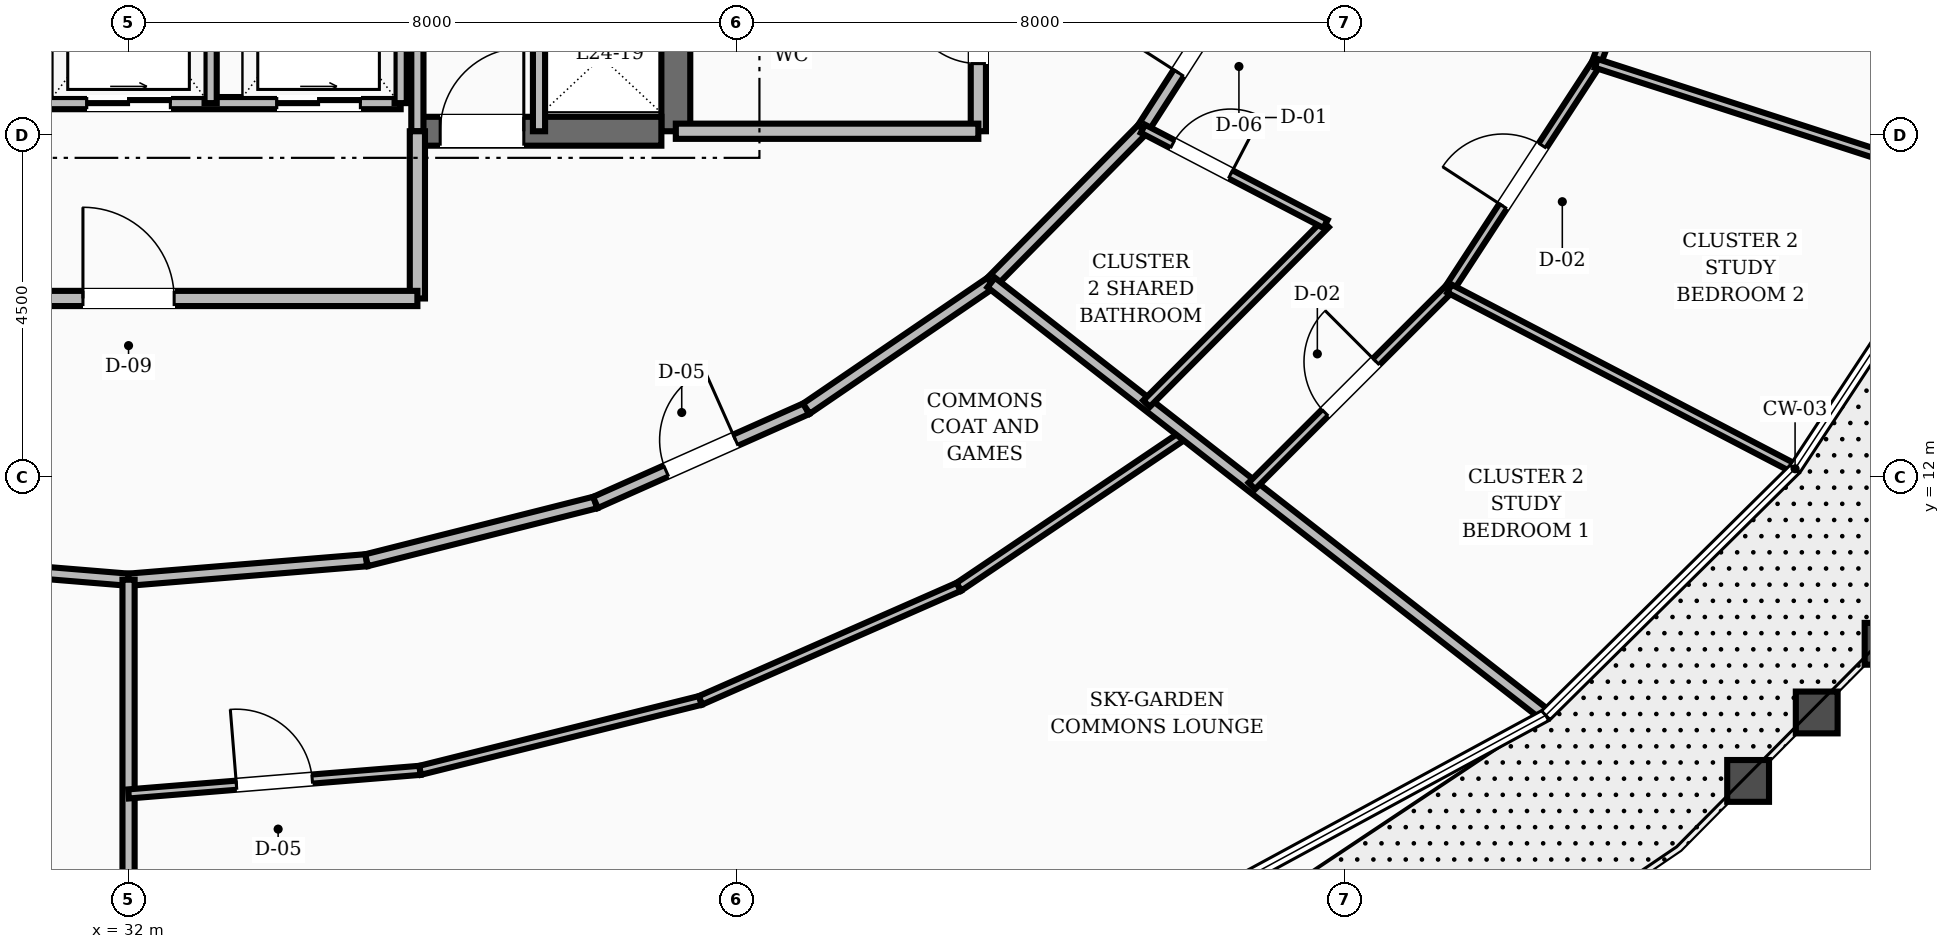
"""IFC4 building model, lengths in metres.
Left out: names, types, materials, properties, quantities, classifications, styles, units other than length and angle.
Written with IfcOpenShell. Run it as: python <this file> out.ifc"""

import sys

from ifc_helpers import new_model, si_unit, direction, frame, frame_2d, origin, place, context, subcontext, project, spatial, rectangle, extrude, element, fill, save


model = new_model("IFC4")
c1 = context("Model", 3, precision=1e-05, world=origin(), true_north=direction((0.0, 1.0)))
c2 = subcontext(c1, "Body", "Model", "MODEL_VIEW")
j1 = project(units=[si_unit("LENGTHUNIT", "METRE"), si_unit("PLANEANGLEUNIT", "RADIAN")], contexts=[c1])
p1 = place(None, origin())
s1 = spatial("IfcSite", under=j1, at=p1, CompositionType="ELEMENT")
p2 = place(p1, origin())
s2 = spatial("IfcBuilding", under=s1, at=p2, CompositionType="ELEMENT")
p3 = place(p2, frame((0.0, 0.0, 95.2)))
s3 = spatial("IfcBuildingStorey", under=s2, at=p3, CompositionType="ELEMENT", Elevation=95.2)
p4 = place(p3, frame((39.2, 16.55, 0.0), z_axis=(0.0, 0.0, 1.0), x_axis=(0.0, 1.0, 0.0)))
e1 = element("IfcWall", 1, at=p4, inside=s3, PredefinedType="SHEAR", context=c2, shape_type="SweptSolid", body=[
    extrude(rectangle(XDim=6.3, YDim=0.38, at=frame_2d((3.15, 0.0))), origin(), (0.0, 0.0, 1.0), 3.6),
])
p5 = place(p3, frame((35.8, 16.55, 0.0), z_axis=(0.0, 0.0, 1.0), x_axis=(1.0, 0.0, 0.0)))
e2 = element("IfcWall", 2, at=p5, inside=s3, PredefinedType="SHEAR", context=c2, shape_type="SweptSolid", body=[
    extrude(rectangle(XDim=3.21, YDim=0.38, at=frame_2d((1.605, 0.0))), origin(), (0.0, 0.0, 1.0), 3.6),
])
p6 = place(p5, frame((0.3, 0.0, 0.0)))
e3 = element("IfcOpeningElement", 3, at=p6, cuts=e2, PredefinedType="OPENING", context=c2, shape_type="SweptSolid", body=[
    extrude(rectangle(XDim=1.1, YDim=2.1, at=frame_2d((0.55, 1.05))), frame((0.0, 0.2, 0.0), z_axis=(0.0, -1.0, 0.0), x_axis=(1.0, 0.0, 0.0)), (0.0, 0.0, 1.0), 0.4),
])
p7 = place(p3, frame((43.18, 16.55, 0.0), z_axis=(0.0, 0.0, 1.0), x_axis=(0.0, 1.0, 0.0)))
e4 = element("IfcWall", 4, at=p7, inside=s3, PredefinedType="SOLIDWALL", context=c2, shape_type="SweptSolid", body=[
    extrude(rectangle(XDim=2.73, YDim=0.2, at=frame_2d((1.365, 0.0))), origin(), (0.0, 0.0, 1.0), 2.71),
])
p8 = place(p7, frame((0.89, 0.0, 0.0)))
e5 = element("IfcOpeningElement", 5, at=p8, cuts=e4, PredefinedType="OPENING", context=c2, shape_type="SweptSolid", body=[
    extrude(rectangle(XDim=0.95, YDim=2.1, at=frame_2d((0.475, 1.05))), frame((0.0, 0.11, 0.0), z_axis=(0.0, -1.0, 0.0), x_axis=(1.0, 0.0, 0.0)), (0.0, 0.0, 1.0), 0.22),
])
p9 = place(p3, frame((39.2, 16.55, 0.0), z_axis=(0.0, 0.0, 1.0), x_axis=(1.0, 0.0, 0.0)))
e6 = element("IfcWall", 6, at=p9, inside=s3, PredefinedType="SOLIDWALL", context=c2, shape_type="SweptSolid", body=[
    extrude(rectangle(XDim=3.98, YDim=0.2, at=frame_2d((1.99, 0.0))), origin(), (0.0, 0.0, 1.0), 2.71),
])
p10 = place(p3, frame((35.8, 16.55, 0.0), z_axis=(0.0, 0.0, 1.0), x_axis=(0.0, 1.0, 0.0)))
e7 = element("IfcWall", 7, at=p10, inside=s3, PredefinedType="SOLIDWALL", context=c2, shape_type="SweptSolid", body=[
    extrude(rectangle(XDim=3.3, YDim=0.16, at=frame_2d((1.65, 0.0))), origin(), (0.0, 0.0, 1.0), 2.71),
])
p11 = place(p3, frame((37.4, 16.55, 0.0), z_axis=(0.0, 0.0, 1.0), x_axis=(0.0, 1.0, 0.0)))
e8 = element("IfcWall", 8, at=p11, inside=s3, PredefinedType="SOLIDWALL", context=c2, shape_type="SweptSolid", body=[
    extrude(rectangle(XDim=1.75, YDim=0.16, at=frame_2d((0.875, 0.0))), origin(), (0.0, 0.0, 1.0), 2.71),
])
p12 = place(p3, frame((35.8, 14.35, 0.0), z_axis=(0.0, 0.0, 1.0), x_axis=(0.0, 1.0, 0.0)))
e9 = element("IfcWall", 9, at=p12, inside=s3, PredefinedType="SOLIDWALL", context=c2, shape_type="SweptSolid", body=[
    extrude(rectangle(XDim=2.2, YDim=0.2, at=frame_2d((1.1, 0.0))), origin(), (0.0, 0.0, 1.0), 2.71),
])
p13 = place(p3, frame((28.2, 14.35, 0.0), z_axis=(0.0, 0.0, 1.0), x_axis=(1.0, 0.0, 0.0)))
e10 = element("IfcWall", 10, at=p13, inside=s3, PredefinedType="SOLIDWALL", context=c2, shape_type="SweptSolid", body=[
    extrude(rectangle(XDim=7.6, YDim=0.2, at=frame_2d((3.8, 0.0))), origin(), (0.0, 0.0, 1.0), 2.71),
])
p14 = place(p13, frame((3.2, 0.0, 0.0)))
e11 = element("IfcOpeningElement", 11, at=p14, cuts=e10, PredefinedType="OPENING", context=c2, shape_type="SweptSolid", body=[
    extrude(rectangle(XDim=1.2, YDim=2.1, at=frame_2d((0.6, 1.05))), frame((0.0, 0.11, 0.0), z_axis=(0.0, -1.0, 0.0), x_axis=(1.0, 0.0, 0.0)), (0.0, 0.0, 1.0), 0.22),
])
p15 = place(p3, frame((28.42, 16.92, 0.0), z_axis=(0.0, 0.0, 1.0), x_axis=(1.0, 0.0, 0.0)))
e12 = element("IfcWall", 12, at=p15, inside=s3, PredefinedType="SOLIDWALL", context=c2, shape_type="SweptSolid", body=[
    extrude(rectangle(XDim=7.16, YDim=0.16, at=frame_2d((3.58, 0.0))), origin(), (0.0, 0.0, 1.0), 2.71),
])
p16 = place(p15, frame((0.53, 0.0, 0.0)))
e13 = element("IfcOpeningElement", 13, at=p16, cuts=e12, PredefinedType="OPENING", context=c2, shape_type="SweptSolid", body=[
    extrude(rectangle(XDim=1.1, YDim=2.15, at=frame_2d((0.55, 1.075))), frame((0.0, 0.09, 0.0), z_axis=(0.0, -1.0, 0.0), x_axis=(1.0, 0.0, 0.0)), (0.0, 0.0, 1.0), 0.18),
])
p17 = place(p15, frame((3.03, 0.0, 0.0)))
e14 = element("IfcOpeningElement", 14, at=p17, cuts=e12, PredefinedType="OPENING", context=c2, shape_type="SweptSolid", body=[
    extrude(rectangle(XDim=1.1, YDim=2.15, at=frame_2d((0.55, 1.075))), frame((0.0, 0.09, 0.0), z_axis=(0.0, -1.0, 0.0), x_axis=(1.0, 0.0, 0.0)), (0.0, 0.0, 1.0), 0.18),
])
p18 = place(p15, frame((5.53, 0.0, 0.0)))
e15 = element("IfcOpeningElement", 15, at=p18, cuts=e12, PredefinedType="OPENING", context=c2, shape_type="SweptSolid", body=[
    extrude(rectangle(XDim=1.1, YDim=2.15, at=frame_2d((0.55, 1.075))), frame((0.0, 0.09, 0.0), z_axis=(0.0, -1.0, 0.0), x_axis=(1.0, 0.0, 0.0)), (0.0, 0.0, 1.0), 0.18),
])
for number, where, z_axis, x_axis in (
    (16, (33.08, 16.92, 0.0), (0.0, 0.0, 1.0), (0.0, 1.0, 0.0)),
    (17, (35.58, 16.92, 0.0), (0.0, 0.0, 1.0), (0.0, 1.0, 0.0)),
):
    element("IfcWall", number, at=place(p3, frame(where, z_axis=z_axis, x_axis=x_axis)), inside=s3, PredefinedType="SOLIDWALL", context=c2, shape_type="SweptSolid", body=[
        extrude(rectangle(XDim=2.76, YDim=0.16, at=frame_2d((1.38, 0.0))), origin(), (0.0, 0.0, 1.0), 2.71),
    ])
p19 = place(p3, frame((28.869, 10.906, 0.0), z_axis=(0.0, 0.0, 1.0), x_axis=(0.996658973252, -0.081675522876, 0.0)))
e18 = element("IfcWall", 18, at=p19, inside=s3, PredefinedType="SOLIDWALL", context=c2, shape_type="SweptSolid", body=[
    extrude(rectangle(XDim=3.142, YDim=0.16, at=frame_2d((1.571, 0.0))), origin(), (0.0, 0.0, 1.0), 2.71),
])
p20 = place(p19, frame((1.096, 0.0, 0.0)))
e19 = element("IfcOpeningElement", 19, at=p20, cuts=e18, PredefinedType="OPENING", context=c2, shape_type="SweptSolid", body=[
    extrude(rectangle(XDim=0.95, YDim=2.1, at=frame_2d((0.475, 1.05))), frame((0.0, 0.09, 0.0), z_axis=(0.0, -1.0, 0.0), x_axis=(1.0, 0.0, 0.0)), (0.0, 0.0, 1.0), 0.18),
])
p21 = place(p3, frame((32.0, 10.65, 0.0), z_axis=(0.0, 0.0, 1.0), x_axis=(0.996658973252, 0.081675522876, 0.0)))
e20 = element("IfcWall", 20, at=p21, inside=s3, PredefinedType="SOLIDWALL", context=c2, shape_type="SweptSolid", body=[
    extrude(rectangle(XDim=3.142, YDim=0.16, at=frame_2d((1.571, 0.0))), origin(), (0.0, 0.0, 1.0), 2.71),
])
p22 = place(p3, frame((35.131, 10.906, 0.0), z_axis=(0.0, 0.0, 1.0), x_axis=(0.969608333194, 0.244662380029, 0.0)))
e21 = element("IfcWall", 21, at=p22, inside=s3, PredefinedType="SOLIDWALL", context=c2, shape_type="SweptSolid", body=[
    extrude(rectangle(XDim=3.105, YDim=0.16, at=frame_2d((1.553, 0.0))), origin(), (0.0, 0.0, 1.0), 2.71),
])
p23 = place(p3, frame((38.142, 11.666, 0.0), z_axis=(0.0, 0.0, 1.0), x_axis=(0.913768445178, 0.406235434936, 0.0)))
e22 = element("IfcWall", 22, at=p23, inside=s3, PredefinedType="SOLIDWALL", context=c2, shape_type="SweptSolid", body=[
    extrude(rectangle(XDim=3.037, YDim=0.16, at=frame_2d((1.519, 0.0))), origin(), (0.0, 0.0, 1.0), 2.71),
])
p24 = place(p23, frame((1.018, 0.0, 0.0)))
e23 = element("IfcOpeningElement", 23, at=p24, cuts=e22, PredefinedType="OPENING", context=c2, shape_type="SweptSolid", body=[
    extrude(rectangle(XDim=1.0, YDim=2.1, at=frame_2d((0.5, 1.05))), frame((0.0, 0.09, 0.0), z_axis=(0.0, -1.0, 0.0), x_axis=(1.0, 0.0, 0.0)), (0.0, 0.0, 1.0), 0.18),
])
p25 = place(p3, frame((40.917, 12.9, 0.0), z_axis=(0.0, 0.0, 1.0), x_axis=(0.825929039072, 0.563774088104, 0.0)))
e24 = element("IfcWall", 24, at=p25, inside=s3, PredefinedType="SOLIDWALL", context=c2, shape_type="SweptSolid", body=[
    extrude(rectangle(XDim=2.945, YDim=0.16, at=frame_2d((1.472, 0.0))), origin(), (0.0, 0.0, 1.0), 2.71),
])
p26 = place(p3, frame((43.349, 14.56, 0.0), z_axis=(0.0, 0.0, 1.0), x_axis=(0.702366174226, 0.711815816981, 0.0)))
e25 = element("IfcWall", 25, at=p26, inside=s3, PredefinedType="SOLIDWALL", context=c2, shape_type="SweptSolid", body=[
    extrude(rectangle(XDim=2.842, YDim=0.16, at=frame_2d((1.421, 0.0))), origin(), (0.0, 0.0, 1.0), 2.71),
])
p27 = place(p3, frame((45.345, 16.583, 0.0), z_axis=(0.0, 0.0, 1.0), x_axis=(0.540595670038, 0.841282545603, 0.0)))
e26 = element("IfcWall", 26, at=p27, inside=s3, PredefinedType="SOLIDWALL", context=c2, shape_type="SweptSolid", body=[
    extrude(rectangle(XDim=2.744, YDim=0.16, at=frame_2d((1.372, 0.0))), origin(), (0.0, 0.0, 1.0), 2.71),
])
p28 = place(p27, frame((0.872, 0.0, 0.0)))
e27 = element("IfcOpeningElement", 27, at=p28, cuts=e26, PredefinedType="OPENING", context=c2, shape_type="SweptSolid", body=[
    extrude(rectangle(XDim=1.0, YDim=2.1, at=frame_2d((0.5, 1.05))), frame((0.0, 0.09, 0.0), z_axis=(0.0, -1.0, 0.0), x_axis=(1.0, 0.0, 0.0)), (0.0, 0.0, 1.0), 0.18),
])
p29 = place(p3, frame((32.0, 10.65, 0.0), z_axis=(0.0, 0.0, 1.0), x_axis=(0.0, -1.0, 0.0)))
e28 = element("IfcWall", 28, at=p29, inside=s3, PredefinedType="SOLIDWALL", context=c2, shape_type="SweptSolid", body=[
    extrude(rectangle(XDim=8.002, YDim=0.16, at=frame_2d((4.001, 0.0))), origin(), (0.0, 0.0, 1.0), 2.71),
])
p30 = place(p3, frame((32.0, 7.832, 0.0), z_axis=(0.0, 0.0, 1.0), x_axis=(0.996738571309, 0.080698330005, 0.0)))
e29 = element("IfcWall", 29, at=p30, inside=s3, PredefinedType="PARTITIONING", context=c2, shape_type="SweptSolid", body=[
    extrude(rectangle(XDim=3.848, YDim=0.12, at=frame_2d((1.924, 0.0))), origin(), (0.0, 0.0, 1.0), 2.71),
])
p31 = place(p30, frame((1.424, 0.0, 0.0)))
e30 = element("IfcOpeningElement", 30, at=p31, cuts=e29, PredefinedType="OPENING", context=c2, shape_type="SweptSolid", body=[
    extrude(rectangle(XDim=1.0, YDim=2.1, at=frame_2d((0.5, 1.05))), frame((0.0, 0.07, 0.0), z_axis=(0.0, -1.0, 0.0), x_axis=(1.0, 0.0, 0.0)), (0.0, 0.0, 1.0), 0.14),
])
p32 = place(p3, frame((35.836, 8.142, 0.0), z_axis=(0.0, 0.0, 1.0), x_axis=(0.970263267769, 0.242052042376, 0.0)))
e31 = element("IfcWall", 31, at=p32, inside=s3, PredefinedType="PARTITIONING", context=c2, shape_type="SweptSolid", body=[
    extrude(rectangle(XDim=3.802, YDim=0.12, at=frame_2d((1.901, 0.0))), origin(), (0.0, 0.0, 1.0), 2.71),
])
p33 = place(p3, frame((39.524, 9.062, 0.0), z_axis=(0.0, 0.0, 1.0), x_axis=(0.915498172981, 0.402322128733, 0.0)))
e32 = element("IfcWall", 32, at=p33, inside=s3, PredefinedType="PARTITIONING", context=c2, shape_type="SweptSolid", body=[
    extrude(rectangle(XDim=3.713, YDim=0.12, at=frame_2d((1.856, 0.0))), origin(), (0.0, 0.0, 1.0), 2.71),
])
p34 = place(p3, frame((42.924, 10.556, 0.0), z_axis=(0.0, 0.0, 1.0), x_axis=(0.828880957911, 0.559425024121, 0.0)))
e33 = element("IfcWall", 33, at=p34, inside=s3, PredefinedType="PARTITIONING", context=c2, shape_type="SweptSolid", body=[
    extrude(rectangle(XDim=3.594, YDim=0.12, at=frame_2d((1.797, 0.0))), origin(), (0.0, 0.0, 1.0), 2.71),
])
p35 = place(p3, frame((43.349, 14.56, 0.0), z_axis=(0.0, 0.0, 1.0), x_axis=(0.788377274066, -0.615192062478, 0.0)))
e34 = element("IfcWall", 34, at=p35, inside=s3, PredefinedType="SOLIDWALL", context=c2, shape_type="SweptSolid", body=[
    extrude(rectangle(XDim=9.205, YDim=0.16, at=frame_2d((4.603, 0.0))), origin(), (0.0, 0.0, 1.0), 2.71),
])
p36 = place(p3, frame((45.392, 12.966, 0.0), z_axis=(0.0, 0.0, 1.0), x_axis=(0.705715635455, 0.708495195379, 0.0)))
e35 = element("IfcWall", 35, at=p36, inside=s3, PredefinedType="PARTITIONING", context=c2, shape_type="SweptSolid", body=[
    extrude(rectangle(XDim=3.338, YDim=0.12, at=frame_2d((1.669, 0.0))), origin(), (0.0, 0.0, 1.0), 2.71),
])
p37 = place(p3, frame((45.345, 16.583, 0.0), z_axis=(0.0, 0.0, 1.0), x_axis=(0.886729414964, -0.46228881085, 0.0)))
e36 = element("IfcWall", 36, at=p37, inside=s3, PredefinedType="PARTITIONING", context=c2, shape_type="SweptSolid", body=[
    extrude(rectangle(XDim=2.709, YDim=0.12, at=frame_2d((1.354, 0.0))), origin(), (0.0, 0.0, 1.0), 2.71),
])
p38 = place(p37, frame((0.44, 0.0, 0.0)))
e37 = element("IfcOpeningElement", 37, at=p38, cuts=e36, PredefinedType="OPENING", context=c2, shape_type="SweptSolid", body=[
    extrude(rectangle(XDim=0.86, YDim=2.1, at=frame_2d((0.43, 1.05))), frame((0.0, 0.07, 0.0), z_axis=(0.0, -1.0, 0.0), x_axis=(1.0, 0.0, 0.0)), (0.0, 0.0, 1.0), 0.14),
])
p39 = place(p3, frame((46.779, 11.884, 0.0), z_axis=(0.0, 0.0, 1.0), x_axis=(0.707472185224, 0.706741188226, 0.0)))
e38 = element("IfcWall", 38, at=p39, inside=s3, PredefinedType="PARTITIONING", context=c2, shape_type="SweptSolid", body=[
    extrude(rectangle(XDim=3.674, YDim=0.12, at=frame_2d((1.837, 0.0))), origin(), (0.0, 0.0, 1.0), 2.71),
])
p40 = place(p39, frame((1.362, 0.0, 0.0)))
e39 = element("IfcOpeningElement", 39, at=p40, cuts=e38, PredefinedType="OPENING", context=c2, shape_type="SweptSolid", body=[
    extrude(rectangle(XDim=0.95, YDim=2.1, at=frame_2d((0.475, 1.05))), frame((0.0, 0.07, 0.0), z_axis=(0.0, -1.0, 0.0), x_axis=(1.0, 0.0, 0.0)), (0.0, 0.0, 1.0), 0.14),
])
p41 = place(p3, frame((49.378, 14.48, 0.0), z_axis=(0.0, 0.0, 1.0), x_axis=(0.546147739328, 0.837688872331, 0.0)))
e40 = element("IfcWall", 40, at=p41, inside=s3, PredefinedType="PARTITIONING", context=c2, shape_type="SweptSolid", body=[
    extrude(rectangle(XDim=3.536, YDim=0.12, at=frame_2d((1.768, 0.0))), origin(), (0.0, 0.0, 1.0), 2.71),
])
p42 = place(p41, frame((1.293, 0.0, 0.0)))
e41 = element("IfcOpeningElement", 41, at=p42, cuts=e40, PredefinedType="OPENING", context=c2, shape_type="SweptSolid", body=[
    extrude(rectangle(XDim=0.95, YDim=2.1, at=frame_2d((0.475, 1.05))), frame((0.0, 0.07, 0.0), z_axis=(0.0, -1.0, 0.0), x_axis=(1.0, 0.0, 0.0)), (0.0, 0.0, 1.0), 0.14),
])
p43 = place(p3, frame((49.378, 14.48, 0.0), z_axis=(0.0, 0.0, 1.0), x_axis=(0.886712531702, -0.462321193677, 0.0)))
e42 = element("IfcWall", 42, at=p43, inside=s3, PredefinedType="PARTITIONING", context=c2, shape_type="SweptSolid", body=[
    extrude(rectangle(XDim=5.079, YDim=0.12, at=frame_2d((2.539, 0.0))), origin(), (0.0, 0.0, 1.0), 2.71),
])
p44 = place(p3, frame((51.309, 17.443, 0.0), z_axis=(0.0, 0.0, 1.0), x_axis=(0.346982565857, 0.937871579157, 0.0)))
e43 = element("IfcWall", 43, at=p44, inside=s3, PredefinedType="PARTITIONING", context=c2, shape_type="SweptSolid", body=[
    extrude(rectangle(XDim=3.427, YDim=0.12, at=frame_2d((1.714, 0.0))), origin(), (0.0, 0.0, 1.0), 2.71),
])
p45 = place(p44, frame((1.239, 0.0, 0.0)))
e44 = element("IfcOpeningElement", 44, at=p45, cuts=e43, PredefinedType="OPENING", context=c2, shape_type="SweptSolid", body=[
    extrude(rectangle(XDim=0.95, YDim=2.1, at=frame_2d((0.475, 1.05))), frame((0.0, 0.07, 0.0), z_axis=(0.0, -1.0, 0.0), x_axis=(1.0, 0.0, 0.0)), (0.0, 0.0, 1.0), 0.14),
])
p46 = place(p3, frame((51.309, 17.443, 0.0), z_axis=(0.0, 0.0, 1.0), x_axis=(0.951535233645, -0.307539752116, 0.0)))
e45 = element("IfcWall", 45, at=p46, inside=s3, PredefinedType="PARTITIONING", context=c2, shape_type="SweptSolid", body=[
    extrude(rectangle(XDim=5.26, YDim=0.12, at=frame_2d((2.63, 0.0))), origin(), (0.0, 0.0, 1.0), 2.71),
])
p47 = place(p8, origin())
e46 = element("IfcDoor", 46, at=p47, inside=s3, OperationType="SINGLE_SWING_RIGHT", PredefinedType="DOOR", context=c2, shape_type="SweptSolid", body=[
    extrude(rectangle(XDim=0.95, YDim=2.1, at=frame_2d((0.475, 1.05))), frame((0.0, 0.025, 0.0), z_axis=(0.0, -1.0, 0.0), x_axis=(1.0, 0.0, 0.0)), (0.0, 0.0, 1.0), 0.05),
])
fill(e5, e46)
p48 = place(p6, origin())
e47 = element("IfcDoor", 47, at=p48, inside=s3, OperationType="SINGLE_SWING_RIGHT", PredefinedType="DOOR", context=c2, shape_type="SweptSolid", body=[
    extrude(rectangle(XDim=1.1, YDim=2.1, at=frame_2d((0.55, 1.05))), frame((0.0, 0.025, 0.0), z_axis=(0.0, -1.0, 0.0), x_axis=(1.0, 0.0, 0.0)), (0.0, 0.0, 1.0), 0.05),
])
fill(e3, e47)
p49 = place(p14, origin())
e48 = element("IfcDoor", 48, at=p49, inside=s3, OperationType="SINGLE_SWING_LEFT", PredefinedType="DOOR", context=c2, shape_type="SweptSolid", body=[
    extrude(rectangle(XDim=1.2, YDim=2.1, at=frame_2d((0.6, 1.05))), frame((0.0, 0.025, 0.0), z_axis=(0.0, -1.0, 0.0), x_axis=(1.0, 0.0, 0.0)), (0.0, 0.0, 1.0), 0.05),
])
fill(e11, e48)
p50 = place(p17, origin())
e49 = element("IfcDoor", 49, at=p50, inside=s3, OperationType="SLIDING_TO_RIGHT", PredefinedType="DOOR", context=c2, shape_type="SweptSolid", body=[
    extrude(rectangle(XDim=1.1, YDim=2.15, at=frame_2d((0.55, 1.075))), frame((0.0, 0.025, 0.0), z_axis=(0.0, -1.0, 0.0), x_axis=(1.0, 0.0, 0.0)), (0.0, 0.0, 1.0), 0.05),
])
fill(e14, e49)
p51 = place(p18, origin())
e50 = element("IfcDoor", 50, at=p51, inside=s3, OperationType="SLIDING_TO_RIGHT", PredefinedType="DOOR", context=c2, shape_type="SweptSolid", body=[
    extrude(rectangle(XDim=1.1, YDim=2.15, at=frame_2d((0.55, 1.075))), frame((0.0, 0.025, 0.0), z_axis=(0.0, -1.0, 0.0), x_axis=(1.0, 0.0, 0.0)), (0.0, 0.0, 1.0), 0.05),
])
fill(e15, e50)
p52 = place(p24, origin())
e51 = element("IfcDoor", 51, at=p52, inside=s3, OperationType="SINGLE_SWING_RIGHT", PredefinedType="DOOR", context=c2, shape_type="SweptSolid", body=[
    extrude(rectangle(XDim=1.0, YDim=2.1, at=frame_2d((0.5, 1.05))), frame((0.0, 0.025, 0.0), z_axis=(0.0, -1.0, 0.0), x_axis=(1.0, 0.0, 0.0)), (0.0, 0.0, 1.0), 0.05),
])
fill(e23, e51)
p53 = place(p31, origin())
e52 = element("IfcDoor", 52, at=p53, inside=s3, OperationType="SINGLE_SWING_LEFT", PredefinedType="DOOR", context=c2, shape_type="SweptSolid", body=[
    extrude(rectangle(XDim=1.0, YDim=2.1, at=frame_2d((0.5, 1.05))), frame((0.0, 0.025, 0.0), z_axis=(0.0, -1.0, 0.0), x_axis=(1.0, 0.0, 0.0)), (0.0, 0.0, 1.0), 0.05),
])
fill(e30, e52)
p54 = place(p38, origin())
e53 = element("IfcDoor", 53, at=p54, inside=s3, OperationType="SINGLE_SWING_RIGHT", PredefinedType="DOOR", context=c2, shape_type="SweptSolid", body=[
    extrude(rectangle(XDim=0.86, YDim=2.1, at=frame_2d((0.43, 1.05))), frame((0.0, 0.025, 0.0), z_axis=(0.0, -1.0, 0.0), x_axis=(1.0, 0.0, 0.0)), (0.0, 0.0, 1.0), 0.05),
])
fill(e37, e53)
p55 = place(p28, origin())
e54 = element("IfcDoor", 54, at=p55, inside=s3, OperationType="SINGLE_SWING_LEFT", PredefinedType="DOOR", context=c2, shape_type="SweptSolid", body=[
    extrude(rectangle(XDim=1.0, YDim=2.1, at=frame_2d((0.5, 1.05))), frame((0.0, 0.025, 0.0), z_axis=(0.0, -1.0, 0.0), x_axis=(1.0, 0.0, 0.0)), (0.0, 0.0, 1.0), 0.05),
])
fill(e27, e54)
p56 = place(p40, origin())
e55 = element("IfcDoor", 55, at=p56, inside=s3, OperationType="SINGLE_SWING_RIGHT", PredefinedType="DOOR", context=c2, shape_type="SweptSolid", body=[
    extrude(rectangle(XDim=0.95, YDim=2.1, at=frame_2d((0.475, 1.05))), frame((0.0, 0.025, 0.0), z_axis=(0.0, -1.0, 0.0), x_axis=(1.0, 0.0, 0.0)), (0.0, 0.0, 1.0), 0.05),
])
fill(e39, e55)
p57 = place(p42, origin())
e56 = element("IfcDoor", 56, at=p57, inside=s3, OperationType="SINGLE_SWING_LEFT", PredefinedType="DOOR", context=c2, shape_type="SweptSolid", body=[
    extrude(rectangle(XDim=0.95, YDim=2.1, at=frame_2d((0.475, 1.05))), frame((0.0, 0.025, 0.0), z_axis=(0.0, -1.0, 0.0), x_axis=(1.0, 0.0, 0.0)), (0.0, 0.0, 1.0), 0.05),
])
fill(e41, e56)
save(model, sys.argv[1])
